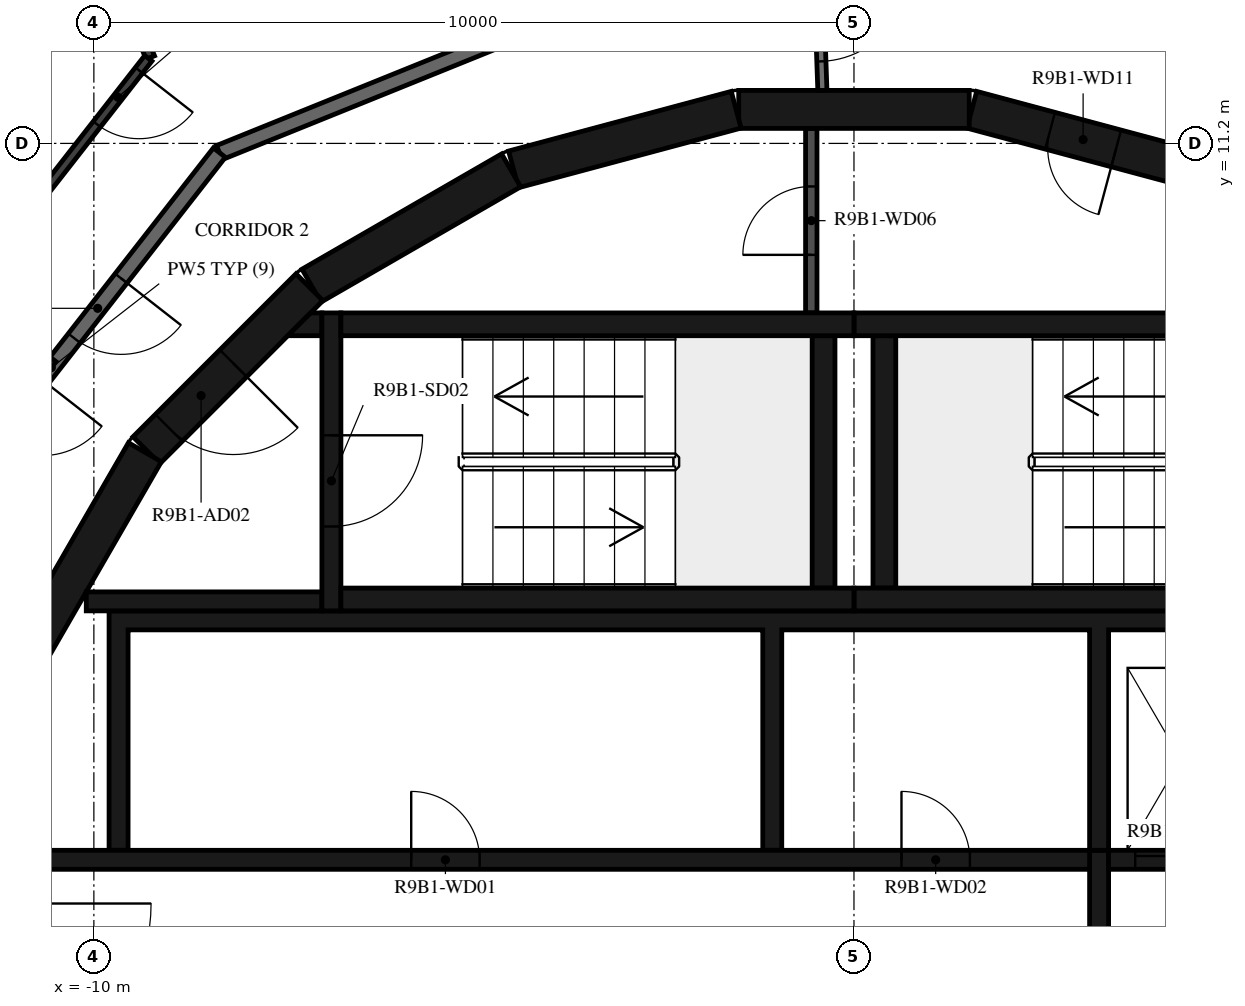
"""IFC4 building model, lengths in metres.
Left out: names, types, materials, properties, quantities, classifications, styles, units other than length and angle.
Written with IfcOpenShell. Run it as: python <this file> out.ifc"""

import sys

from ifc_helpers import new_model, si_unit, direction, frame, frame_2d, origin, place, context, subcontext, project, spatial, polyline, rectangle, outline, extrude, element, fill, save


model = new_model("IFC4")
c1 = context("Model", 3, precision=1e-05, world=origin(), true_north=direction((0.0, 1.0)))
c2 = subcontext(c1, "Body", "Model", "MODEL_VIEW")
j1 = project(units=[si_unit("LENGTHUNIT", "METRE"), si_unit("PLANEANGLEUNIT", "RADIAN")], contexts=[c1])
p1 = place(None, origin())
s1 = spatial("IfcSite", under=j1, at=p1, CompositionType="ELEMENT")
p2 = place(p1, origin())
s2 = spatial("IfcBuilding", under=s1, at=p2, CompositionType="ELEMENT")
p3 = place(p2, frame((0.0, 0.0, 350.5)))
s3 = spatial("IfcBuildingStorey", under=s2, at=p3, CompositionType="ELEMENT", Elevation=350.5)
p4 = place(p3, frame((4.479, 10.858, 0.0), z_axis=(0.0, 0.0, 1.0), x_axis=(-0.965948410781, 0.258734743916, 0.0)))
e1 = element("IfcWall", 1, at=p4, inside=s3, PredefinedType="SHEAR", context=c2, shape_type="SweptSolid", body=[
    extrude(rectangle(XDim=3.033, YDim=0.5, at=frame_2d((1.516, 0.0))), origin(), (0.0, 0.0, 1.0), 3.12),
])
p5 = place(p4, frame((1.066, 0.0, 0.0)))
e2 = element("IfcOpeningElement", 2, at=p5, cuts=e1, PredefinedType="OPENING", context=c2, shape_type="SweptSolid", body=[
    extrude(rectangle(XDim=0.9, YDim=2.1, at=frame_2d((0.45, 1.05))), frame((0.0, 0.26, 0.0), z_axis=(0.0, -1.0, 0.0), x_axis=(1.0, 0.0, 0.0)), (0.0, 0.0, 1.0), 0.52),
])
for number, where, z_axis, x_axis in (
    (3, (1.516, 11.647, 0.0), (0.0, 0.0, 1.0), (-1.0, 0.0, 0.0)),
    (4, (-1.55, 11.643, 0.0), (0.0, 0.0, 1.0), (-0.966, -0.259, 0.0)),
    (5, (-4.51, 10.845, 0.0), (0.0, 0.0, 1.0), (-0.866, -0.5, 0.0)),
):
    element("IfcWall", number, at=place(p3, frame(where, z_axis=z_axis, x_axis=x_axis)), inside=s3, PredefinedType="SHEAR", context=c2, shape_type="SweptSolid", body=[
        extrude(rectangle(XDim=3.033, YDim=0.5, at=frame_2d((1.516, 0.0))), origin(), (0.0, 0.0, 1.0), 3.12),
    ])
p6 = place(p3, frame((-7.164, 9.308, 0.0), z_axis=(0.0, 0.0, 1.0), x_axis=(-0.707106781187, -0.707106781187, 0.0)))
e6 = element("IfcWall", 6, at=p6, inside=s3, PredefinedType="SHEAR", context=c2, shape_type="SweptSolid", body=[
    extrude(rectangle(XDim=3.032, YDim=0.5, at=frame_2d((1.516, 0.0))), origin(), (0.0, 0.0, 1.0), 3.12),
])
p7 = place(p6, frame((1.416, 0.0, 0.0)))
e7 = element("IfcOpeningElement", 7, at=p7, cuts=e6, PredefinedType="OPENING", context=c2, shape_type="SweptSolid", body=[
    extrude(rectangle(XDim=1.2, YDim=2.1, at=frame_2d((0.6, 1.05))), frame((0.0, 0.26, 0.0), z_axis=(0.0, -1.0, 0.0), x_axis=(1.0, 0.0, 0.0)), (0.0, 0.0, 1.0), 0.52),
])
p8 = place(p3, frame((-9.329, 7.137, 0.0), z_axis=(0.0, 0.0, 1.0), x_axis=(-0.500087131594, -0.865975092491, 0.0)))
e8 = element("IfcWall", 8, at=p8, inside=s3, PredefinedType="SHEAR", context=c2, shape_type="SweptSolid", body=[
    extrude(rectangle(XDim=3.033, YDim=0.5, at=frame_2d((1.516, 0.0))), origin(), (0.0, 0.0, 1.0), 3.12),
])
for number, where, z_axis, x_axis in (
    (9, (0.0, 5.2, 0.0), (0.0, 0.0, 1.0), (1.0, 0.0, 0.0)),
    (10, (0.0, 8.82, 0.0), (0.0, 0.0, 1.0), (1.0, 0.0, 0.0)),
):
    element("IfcWall", number, at=place(p3, frame(where, z_axis=z_axis, x_axis=x_axis)), inside=s3, PredefinedType="SHEAR", context=c2, shape_type="SweptSolid", body=[
        extrude(rectangle(XDim=6.75, YDim=0.3, at=frame_2d((3.375, 0.0))), origin(), (0.0, 0.0, 1.0), 3.12),
    ])
p9 = place(p3, frame((0.4, 5.35, 0.0), z_axis=(0.0, 0.0, 1.0), x_axis=(0.0, 1.0, 0.0)))
e11 = element("IfcWall", 11, at=p9, inside=s3, PredefinedType="SHEAR", context=c2, shape_type="SweptSolid", body=[
    extrude(rectangle(XDim=3.32, YDim=0.3, at=frame_2d((1.66, 0.0))), origin(), (0.0, 0.0, 1.0), 3.12),
])
for number, where, z_axis, x_axis in (
    (12, (-6.75, 5.2, 0.0), (0.0, 0.0, 1.0), (1.0, 0.0, 0.0)),
    (13, (-6.75, 8.82, 0.0), (0.0, 0.0, 1.0), (1.0, 0.0, 0.0)),
):
    element("IfcWall", number, at=place(p3, frame(where, z_axis=z_axis, x_axis=x_axis)), inside=s3, PredefinedType="SHEAR", context=c2, shape_type="SweptSolid", body=[
        extrude(rectangle(XDim=6.75, YDim=0.3, at=frame_2d((3.375, 0.0))), origin(), (0.0, 0.0, 1.0), 3.12),
    ])
p10 = place(p3, frame((-0.4, 5.35, 0.0), z_axis=(0.0, 0.0, 1.0), x_axis=(0.0, 1.0, 0.0)))
e14 = element("IfcWall", 14, at=p10, inside=s3, PredefinedType="SHEAR", context=c2, shape_type="SweptSolid", body=[
    extrude(rectangle(XDim=3.32, YDim=0.3, at=frame_2d((1.66, 0.0))), origin(), (0.0, 0.0, 1.0), 3.12),
])
p11 = place(p3, frame((-6.875, 8.97, 0.0), z_axis=(0.0, 0.0, 1.0), x_axis=(0.0, -1.0, 0.0)))
e15 = element("IfcWall", 15, at=p11, inside=s3, PredefinedType="SHEAR", context=c2, shape_type="SweptSolid", body=[
    extrude(rectangle(XDim=3.92, YDim=0.25, at=frame_2d((1.96, 0.0))), origin(), (0.0, 0.0, 1.0), 3.12),
])
p12 = place(p11, frame((1.61, 0.0, 0.0)))
e16 = element("IfcOpeningElement", 16, at=p12, cuts=e15, PredefinedType="OPENING", context=c2, shape_type="SweptSolid", body=[
    extrude(rectangle(XDim=1.2, YDim=2.1, at=frame_2d((0.6, 1.05))), frame((0.0, 0.135, 0.0), z_axis=(0.0, -1.0, 0.0), x_axis=(1.0, 0.0, 0.0)), (0.0, 0.0, 1.0), 0.27),
])
p13 = place(p3, frame((-7.0, 5.175, 0.0), z_axis=(0.0, 0.0, 1.0), x_axis=(-1.0, 0.0, 0.0)))
e17 = element("IfcWall", 17, at=p13, inside=s3, PredefinedType="SHEAR", context=c2, shape_type="SweptSolid", body=[
    extrude(rectangle(XDim=3.1, YDim=0.25, at=frame_2d((1.55, 0.0))), origin(), (0.0, 0.0, 1.0), 3.12),
])
p14 = place(p3, origin())
e18 = element("IfcWall", 18, at=p14, inside=s3, PredefinedType="SHEAR", context=c2, shape_type="SweptSolid", body=[
    extrude(outline(polyline([(-7.148, 8.97), (-7.0, 8.97), (-7.0, 8.67), (-7.448, 8.67), (-7.148, 8.97)])), origin(), (0.0, 0.0, 1.0), 3.12),
])
p15 = place(p3, origin())
e19 = element("IfcWall", 19, at=p15, inside=s3, PredefinedType="SHEAR", context=c2, shape_type="SweptSolid", body=[
    extrude(outline(polyline([(-9.8, 1.9), (-9.55, 1.9), (-9.55, 4.8), (-1.2, 4.8), (-1.2, 1.9), (-0.95, 1.9), (-0.95, 4.8), (3.1, 4.8), (3.1, 1.9), (3.35, 1.9), (3.35, 4.8), (5.25, 4.8), (5.25, 1.9), (5.5, 1.9), (5.5, 4.8), (7.4, 4.8), (7.4, 1.9), (7.65, 1.9), (7.65, 4.8), (9.55, 4.8), (9.55, 1.9), (9.8, 1.9), (9.8, 4.8), (9.8, 5.05), (-9.8, 5.05), (-9.8, 4.8), (-9.8, 1.9)])), origin(), (0.0, 0.0, 1.0), 3.12),
])
p16 = place(p3, frame((-11.28, 1.775, 0.0), z_axis=(0.0, 0.0, 1.0), x_axis=(1.0, 0.0, 0.0)))
e20 = element("IfcWall", 20, at=p16, inside=s3, PredefinedType="SHEAR", context=c2, shape_type="SweptSolid", body=[
    extrude(rectangle(XDim=14.38, YDim=0.25, at=frame_2d((7.19, 0.0))), origin(), (0.0, 0.0, 1.0), 3.12),
])
p17 = place(p16, frame((5.455, 0.0, 0.0)))
e21 = element("IfcOpeningElement", 21, at=p17, cuts=e20, PredefinedType="OPENING", context=c2, shape_type="SweptSolid", body=[
    extrude(rectangle(XDim=0.9, YDim=2.1, at=frame_2d((0.45, 1.05))), frame((0.0, 0.135, 0.0), z_axis=(0.0, -1.0, 0.0), x_axis=(1.0, 0.0, 0.0)), (0.0, 0.0, 1.0), 0.27),
])
p18 = place(p16, frame((11.905, 0.0, 0.0)))
e22 = element("IfcOpeningElement", 22, at=p18, cuts=e20, PredefinedType="OPENING", context=c2, shape_type="SweptSolid", body=[
    extrude(rectangle(XDim=0.9, YDim=2.1, at=frame_2d((0.45, 1.05))), frame((0.0, 0.135, 0.0), z_axis=(0.0, -1.0, 0.0), x_axis=(1.0, 0.0, 0.0)), (0.0, 0.0, 1.0), 0.27),
])
p19 = place(p3, frame((3.35, 1.775, 0.0), z_axis=(0.0, 0.0, 1.0), x_axis=(1.0, 0.0, 0.0)))
e23 = element("IfcWall", 23, at=p19, inside=s3, PredefinedType="SHEAR", context=c2, shape_type="SweptSolid", body=[
    extrude(rectangle(XDim=7.93, YDim=0.25, at=frame_2d((3.965, 0.0))), origin(), (0.0, 0.0, 1.0), 3.12),
])
p20 = place(p19, frame((0.35, 0.0, 0.0)))
e24 = element("IfcOpeningElement", 24, at=p20, cuts=e23, PredefinedType="OPENING", context=c2, shape_type="SweptSolid", body=[
    extrude(rectangle(XDim=1.2, YDim=2.4, at=frame_2d((0.6, 1.2))), frame((0.0, 0.135, 0.0), z_axis=(0.0, -1.0, 0.0), x_axis=(1.0, 0.0, 0.0)), (0.0, 0.0, 1.0), 0.27),
])
p21 = place(p19, frame((2.5, 0.0, 0.0)))
e25 = element("IfcOpeningElement", 25, at=p21, cuts=e23, PredefinedType="OPENING", context=c2, shape_type="SweptSolid", body=[
    extrude(rectangle(XDim=1.2, YDim=2.4, at=frame_2d((0.6, 1.2))), frame((0.0, 0.135, 0.0), z_axis=(0.0, -1.0, 0.0), x_axis=(1.0, 0.0, 0.0)), (0.0, 0.0, 1.0), 0.27),
])
p22 = place(p19, frame((4.8, 0.0, 0.0)))
e26 = element("IfcOpeningElement", 26, at=p22, cuts=e23, PredefinedType="OPENING", context=c2, shape_type="SweptSolid", body=[
    extrude(rectangle(XDim=0.9, YDim=2.1, at=frame_2d((0.45, 1.05))), frame((0.0, 0.135, 0.0), z_axis=(0.0, -1.0, 0.0), x_axis=(1.0, 0.0, 0.0)), (0.0, 0.0, 1.0), 0.27),
])
p23 = place(p3, frame((3.225, -1.9, 0.0), z_axis=(0.0, 0.0, 1.0), x_axis=(0.0, 1.0, 0.0)))
e27 = element("IfcWall", 27, at=p23, inside=s3, PredefinedType="SHEAR", context=c2, shape_type="SweptSolid", body=[
    extrude(rectangle(XDim=3.8, YDim=0.25, at=frame_2d((1.9, 0.0))), origin(), (0.0, 0.0, 1.0), 3.12),
])
p24 = place(p3, frame((-0.562, 8.97, 0.0), z_axis=(0.0, 0.0, 1.0), x_axis=(0.0, 1.0, 0.0)))
e28 = element("IfcWall", 28, at=p24, inside=s3, PredefinedType="PARTITIONING", context=c2, shape_type="SweptSolid", body=[
    extrude(rectangle(XDim=2.427, YDim=0.15, at=frame_2d((1.214, 0.0))), origin(), (0.0, 0.0, 1.0), 3.12),
])
p25 = place(p24, frame((0.764, 0.0, 0.0)))
e29 = element("IfcOpeningElement", 29, at=p25, cuts=e28, PredefinedType="OPENING", context=c2, shape_type="SweptSolid", body=[
    extrude(rectangle(XDim=0.9, YDim=2.1, at=frame_2d((0.45, 1.05))), frame((0.0, 0.085, 0.0), z_axis=(0.0, -1.0, 0.0), x_axis=(1.0, 0.0, 0.0)), (0.0, 0.0, 1.0), 0.17),
])
p26 = place(p3, frame((-0.475, 13.598, 0.0), z_axis=(0.0, 0.0, 1.0), x_axis=(0.034852521429, -0.999392466326, 0.0)))
e30 = element("IfcWall", 30, at=p26, inside=s3, PredefinedType="PARTITIONING", context=c2, shape_type="SweptSolid", body=[
    extrude(rectangle(XDim=1.702, YDim=0.12, at=frame_2d((0.851, 0.0))), origin(), (0.0, 0.0, 1.0), 3.12),
])
p27 = place(p26, frame((0.12, 0.0, 0.0)))
e31 = element("IfcOpeningElement", 31, at=p27, cuts=e30, PredefinedType="OPENING", context=c2, shape_type="SweptSolid", body=[
    extrude(rectangle(XDim=1.2, YDim=2.1, at=frame_2d((0.6, 1.05))), frame((0.0, 0.07, 0.0), z_axis=(0.0, -1.0, 0.0), x_axis=(1.0, 0.0, 0.0)), (0.0, 0.0, 1.0), 0.14),
])
p28 = place(p3, frame((-1.691, 13.769, 0.0), z_axis=(0.0, 0.0, 1.0), x_axis=(-0.92717916932, -0.374618189599, 0.0)))
e32 = element("IfcWall", 32, at=p28, inside=s3, PredefinedType="STANDARD", context=c2, shape_type="SweptSolid", body=[
    extrude(rectangle(XDim=7.181, YDim=0.2, at=frame_2d((3.591, 0.0))), origin(), (0.0, 0.0, 1.0), 3.12),
])
p29 = place(p3, frame((-8.349, 11.079, 0.0), z_axis=(0.0, 0.0, 1.0), x_axis=(-0.615669112324, -0.78800478687, 0.0)))
e33 = element("IfcWall", 33, at=p29, inside=s3, PredefinedType="STANDARD", context=c2, shape_type="SweptSolid", body=[
    extrude(rectangle(XDim=7.181, YDim=0.2, at=frame_2d((3.591, 0.0))), origin(), (0.0, 0.0, 1.0), 3.12),
])
p30 = place(p29, frame((2.1, 0.0, 0.0)))
e34 = element("IfcOpeningElement", 34, at=p30, cuts=e33, PredefinedType="OPENING", context=c2, shape_type="SweptSolid", body=[
    extrude(rectangle(XDim=1.0, YDim=2.1, at=frame_2d((0.5, 1.05))), frame((0.0, 0.11, 0.0), z_axis=(0.0, -1.0, 0.0), x_axis=(1.0, 0.0, 0.0)), (0.0, 0.0, 1.0), 0.22),
])
p31 = place(p29, frame((3.79, 0.0, 0.0)))
e35 = element("IfcOpeningElement", 35, at=p31, cuts=e33, PredefinedType="OPENING", context=c2, shape_type="SweptSolid", body=[
    extrude(rectangle(XDim=1.0, YDim=2.1, at=frame_2d((0.5, 1.05))), frame((0.0, 0.11, 0.0), z_axis=(0.0, -1.0, 0.0), x_axis=(1.0, 0.0, 0.0)), (0.0, 0.0, 1.0), 0.22),
])
p32 = place(p3, frame((-12.479, 9.75, 0.0), z_axis=(0.0, 0.0, 1.0), x_axis=(0.788050197026, -0.615610986717, 0.0)))
e36 = element("IfcWall", 36, at=p32, inside=s3, PredefinedType="STANDARD", context=c2, shape_type="SweptSolid", body=[
    extrude(rectangle(XDim=2.437, YDim=0.2, at=frame_2d((1.218, 0.0))), origin(), (0.0, 0.0, 1.0), 3.12),
])
p33 = place(p3, frame((-9.691, 13.402, 0.0), z_axis=(0.0, 0.0, 1.0), x_axis=(0.374484003097, -0.927233374844, 0.0)))
e37 = element("IfcWall", 37, at=p33, inside=s3, PredefinedType="PARTITIONING", context=c2, shape_type="SweptSolid", body=[
    extrude(rectangle(XDim=1.156, YDim=0.12, at=frame_2d((0.578, 0.0))), origin(), (0.0, 0.0, 1.0), 3.12),
])
p34 = place(p3, frame((-9.283, 12.319, 0.0), z_axis=(0.0, 0.0, 1.0), x_axis=(-0.61567489546, -0.788000268464, 0.0)))
e38 = element("IfcWall", 38, at=p34, inside=s3, PredefinedType="PARTITIONING", context=c2, shape_type="SweptSolid", body=[
    extrude(rectangle(XDim=7.985, YDim=0.12, at=frame_2d((3.992, 0.0))), origin(), (0.0, 0.0, 1.0), 3.12),
])
p35 = place(p34, frame((0.2, 0.0, 0.0)))
e39 = element("IfcOpeningElement", 39, at=p35, cuts=e38, PredefinedType="OPENING", context=c2, shape_type="SweptSolid", body=[
    extrude(rectangle(XDim=0.9, YDim=2.1, at=frame_2d((0.45, 1.05))), frame((0.0, 0.07, 0.0), z_axis=(0.0, -1.0, 0.0), x_axis=(1.0, 0.0, 0.0)), (0.0, 0.0, 1.0), 0.14),
])
p36 = place(p34, frame((4.592, 0.0, 0.0)))
e40 = element("IfcOpeningElement", 40, at=p36, cuts=e38, PredefinedType="OPENING", context=c2, shape_type="SweptSolid", body=[
    extrude(rectangle(XDim=0.9, YDim=2.1, at=frame_2d((0.45, 1.05))), frame((0.0, 0.07, 0.0), z_axis=(0.0, -1.0, 0.0), x_axis=(1.0, 0.0, 0.0)), (0.0, 0.0, 1.0), 0.14),
])
p37 = place(p12, origin())
e41 = element("IfcDoor", 41, at=p37, inside=s3, OperationType="SINGLE_SWING_LEFT", PredefinedType="DOOR", context=c2, shape_type="SweptSolid", body=[
    extrude(rectangle(XDim=1.2, YDim=2.1, at=frame_2d((0.6, 1.05))), frame((0.0, 0.025, 0.0), z_axis=(0.0, -1.0, 0.0), x_axis=(1.0, 0.0, 0.0)), (0.0, 0.0, 1.0), 0.05),
])
fill(e16, e41)
p38 = place(p7, origin())
e42 = element("IfcDoor", 42, at=p38, inside=s3, OperationType="SINGLE_SWING_RIGHT", PredefinedType="DOOR", context=c2, shape_type="SweptSolid", body=[
    extrude(rectangle(XDim=1.2, YDim=2.1, at=frame_2d((0.6, 1.05))), frame((0.0, 0.025, 0.0), z_axis=(0.0, -1.0, 0.0), x_axis=(1.0, 0.0, 0.0)), (0.0, 0.0, 1.0), 0.05),
])
fill(e7, e42)
p39 = place(p20, origin())
e43 = element("IfcDoor", 43, at=p39, inside=s3, OperationType="DOUBLE_DOOR_SLIDING", PredefinedType="DOOR", context=c2, shape_type="SweptSolid", body=[
    extrude(rectangle(XDim=1.2, YDim=2.4, at=frame_2d((0.6, 1.2))), frame((0.0, 0.025, 0.0), z_axis=(0.0, -1.0, 0.0), x_axis=(1.0, 0.0, 0.0)), (0.0, 0.0, 1.0), 0.05),
])
fill(e24, e43)
p40 = place(p17, origin())
e44 = element("IfcDoor", 44, at=p40, inside=s3, OperationType="SINGLE_SWING_LEFT", PredefinedType="DOOR", context=c2, shape_type="SweptSolid", body=[
    extrude(rectangle(XDim=0.9, YDim=2.1, at=frame_2d((0.45, 1.05))), frame((0.0, 0.025, 0.0), z_axis=(0.0, -1.0, 0.0), x_axis=(1.0, 0.0, 0.0)), (0.0, 0.0, 1.0), 0.05),
])
fill(e21, e44)
p41 = place(p18, origin())
e45 = element("IfcDoor", 45, at=p41, inside=s3, OperationType="SINGLE_SWING_RIGHT", PredefinedType="DOOR", context=c2, shape_type="SweptSolid", body=[
    extrude(rectangle(XDim=0.9, YDim=2.1, at=frame_2d((0.45, 1.05))), frame((0.0, 0.025, 0.0), z_axis=(0.0, -1.0, 0.0), x_axis=(1.0, 0.0, 0.0)), (0.0, 0.0, 1.0), 0.05),
])
fill(e22, e45)
p42 = place(p25, origin())
e46 = element("IfcDoor", 46, at=p42, inside=s3, OperationType="SINGLE_SWING_RIGHT", PredefinedType="DOOR", context=c2, shape_type="SweptSolid", body=[
    extrude(rectangle(XDim=0.9, YDim=2.1, at=frame_2d((0.45, 1.05))), frame((0.0, 0.025, 0.0), z_axis=(0.0, -1.0, 0.0), x_axis=(1.0, 0.0, 0.0)), (0.0, 0.0, 1.0), 0.05),
])
fill(e29, e46)
p43 = place(p5, origin())
e47 = element("IfcDoor", 47, at=p43, inside=s3, OperationType="SINGLE_SWING_LEFT", PredefinedType="DOOR", context=c2, shape_type="SweptSolid", body=[
    extrude(rectangle(XDim=0.9, YDim=2.1, at=frame_2d((0.45, 1.05))), frame((0.0, 0.025, 0.0), z_axis=(0.0, -1.0, 0.0), x_axis=(1.0, 0.0, 0.0)), (0.0, 0.0, 1.0), 0.05),
])
fill(e2, e47)
p44 = place(p30, origin())
e48 = element("IfcDoor", 48, at=p44, inside=s3, OperationType="SINGLE_SWING_RIGHT", PredefinedType="DOOR", context=c2, shape_type="SweptSolid", body=[
    extrude(rectangle(XDim=1.0, YDim=2.1, at=frame_2d((0.5, 1.05))), frame((0.0, 0.025, 0.0), z_axis=(0.0, -1.0, 0.0), x_axis=(1.0, 0.0, 0.0)), (0.0, 0.0, 1.0), 0.05),
])
fill(e34, e48)
p45 = place(p35, origin())
e49 = element("IfcDoor", 49, at=p45, inside=s3, OperationType="SINGLE_SWING_RIGHT", PredefinedType="DOOR", context=c2, shape_type="SweptSolid", body=[
    extrude(rectangle(XDim=0.9, YDim=2.1, at=frame_2d((0.45, 1.05))), frame((0.0, 0.025, 0.0), z_axis=(0.0, -1.0, 0.0), x_axis=(1.0, 0.0, 0.0)), (0.0, 0.0, 1.0), 0.05),
])
fill(e39, e49)
p46 = place(p27, origin())
e50 = element("IfcDoor", 50, at=p46, inside=s3, OperationType="DOUBLE_DOOR_SINGLE_SWING", PredefinedType="DOOR", context=c2, shape_type="SweptSolid", body=[
    extrude(rectangle(XDim=1.2, YDim=2.1, at=frame_2d((0.6, 1.05))), frame((0.0, 0.025, 0.0), z_axis=(0.0, -1.0, 0.0), x_axis=(1.0, 0.0, 0.0)), (0.0, 0.0, 1.0), 0.05),
])
fill(e31, e50)
save(model, sys.argv[1])
